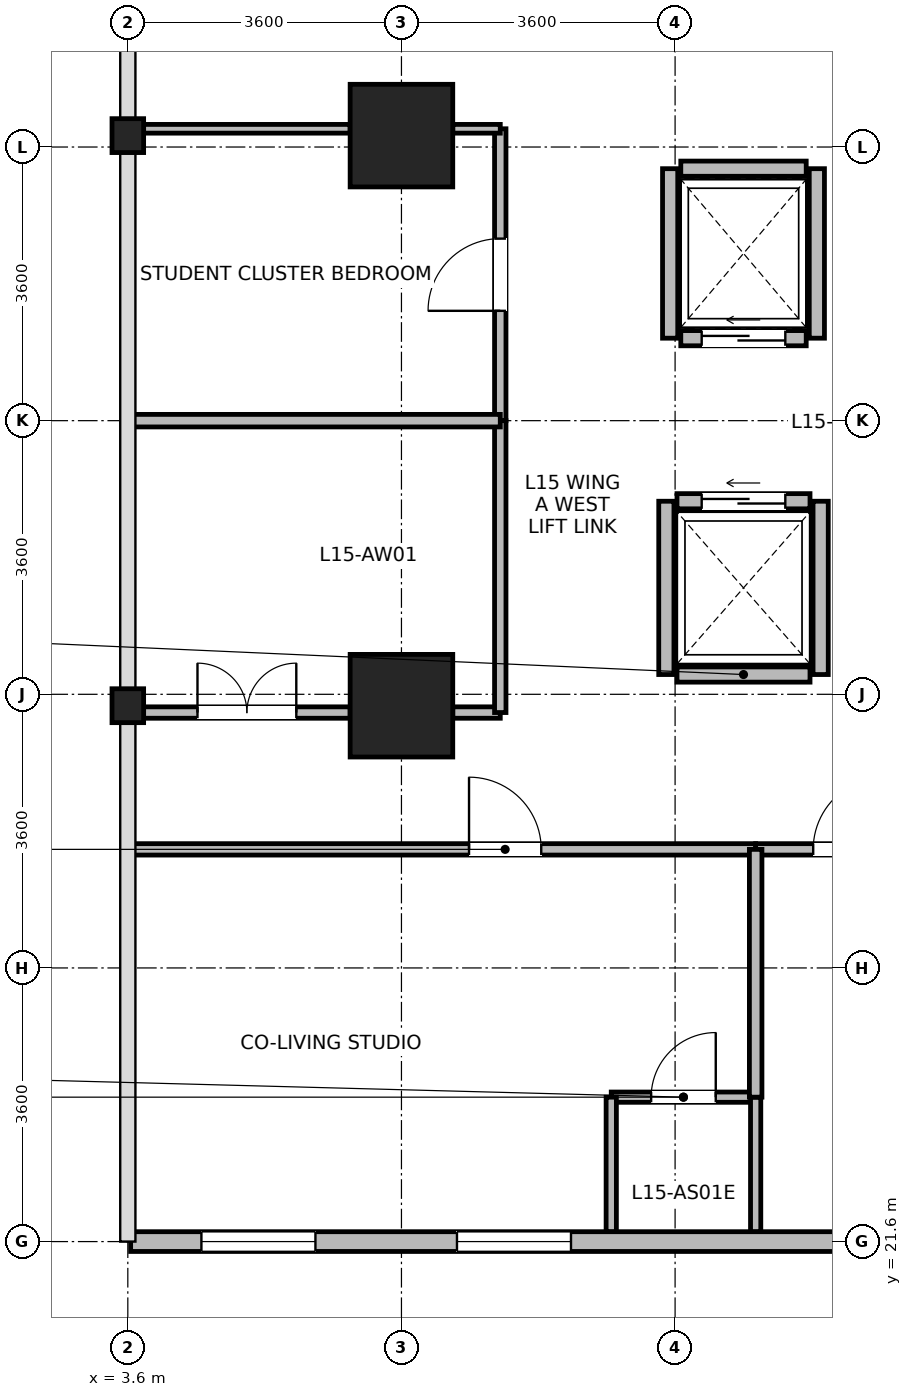
"""IFC4 building model, lengths in metres.
Left out: names, types, materials, properties, quantities, classifications, styles, units other than length and angle.
Written with IfcOpenShell. Run it as: python <this file> out.ifc"""

import sys

from ifc_helpers import new_model, si_unit, direction, frame, frame_2d, origin, origin_2d, place, context, subcontext, project, spatial, rectangle, i_section, extrude, source, transform, mapped, element, fill, save


model = new_model("IFC4")
c1 = context("Model", 3, precision=1e-05, world=origin(), true_north=direction((0.0, 1.0)))
c2 = subcontext(c1, "Body", "Model", "MODEL_VIEW")
j1 = project(units=[si_unit("LENGTHUNIT", "METRE"), si_unit("PLANEANGLEUNIT", "RADIAN")], contexts=[c1])
p1 = place(None, origin())
s1 = spatial("IfcSite", under=j1, at=p1, CompositionType="ELEMENT")
p2 = place(p1, origin())
s2 = spatial("IfcBuilding", under=s1, at=p2, CompositionType="ELEMENT")
p3 = place(p2, frame((0.0, 0.0, 62.3)))
s3 = spatial("IfcBuildingStorey", under=s2, at=p3, CompositionType="ELEMENT", Elevation=62.3)
m1 = source(origin(), c2, "Body", "SweptSolid", [
    extrude(rectangle(XDim=1.35, YDim=1.35, at=origin_2d()), origin(), (0.0, 0.0, 1.0), 3.7),
])
for number, where, z_axis, x_axis in (
    (1, (7.2, 28.65, 0.0), (0.0, 0.0, 1.0), (1.0, 0.0, 0.0)),
    (2, (7.2, 36.15, 0.0), (0.0, 0.0, 1.0), (1.0, 0.0, 0.0)),
):
    element("IfcColumn", number, at=place(p3, frame(where, z_axis=z_axis, x_axis=x_axis)), inside=s3, PredefinedType="COLUMN", context=c2, shape_type="MappedRepresentation", body=[
        mapped(m1, transform((0.0, 0.0, 0.0), x_axis=(1.0, 0.0, 0.0), y_axis=(0.0, 1.0, 0.0), z_axis=(0.0, 0.0, 1.0), scale=1.0)),
    ])
m2 = source(origin(), c2, "Body", "SweptSolid", [
    extrude(i_section(OverallWidth=0.416, OverallDepth=0.446, WebThickness=0.029, FlangeThickness=0.04, FilletRadius=0.015, at=origin_2d()), origin(), (0.0, 0.0, 1.0), 3.7),
])
for number, where, z_axis, x_axis in (
    (3, (3.6, 28.65, 0.0), (0.0, 0.0, 1.0), (1.0, 0.0, 0.0)),
    (4, (3.6, 36.15, 0.0), (0.0, 0.0, 1.0), (1.0, 0.0, 0.0)),
):
    element("IfcColumn", number, at=place(p3, frame(where, z_axis=z_axis, x_axis=x_axis)), inside=s3, PredefinedType="COLUMN", context=c2, shape_type="MappedRepresentation", body=[
        mapped(m2, transform((0.0, 0.0, 0.0), x_axis=(1.0, 0.0, 0.0), y_axis=(0.0, 1.0, 0.0), z_axis=(0.0, 0.0, 1.0), scale=1.0)),
    ])
p4 = place(p3, frame((13.724, 21.6, 0.0), z_axis=(0.0, 0.0, 1.0), x_axis=(-1.0, 0.0, 0.0)))
e5 = element("IfcWall", 5, at=p4, inside=s3, PredefinedType="STANDARD", context=c2, shape_type="SweptSolid", body=[
    extrude(rectangle(XDim=10.087, YDim=0.26, at=frame_2d((5.043, 0.0))), origin(), (0.0, 0.0, 1.0), 3.43),
])
p5 = place(p4, frame((4.293, 0.0, 0.85)))
e6 = element("IfcOpeningElement", 6, at=p5, cuts=e5, PredefinedType="OPENING", context=c2, shape_type="SweptSolid", body=[
    extrude(rectangle(XDim=1.5, YDim=1.85, at=frame_2d((0.75, 0.925))), frame((0.0, 0.14, 0.0), z_axis=(0.0, -1.0, 0.0), x_axis=(1.0, 0.0, 0.0)), (0.0, 0.0, 1.0), 0.28),
])
p6 = place(p4, frame((7.656, 0.0, 0.85)))
e7 = element("IfcOpeningElement", 7, at=p6, cuts=e5, PredefinedType="OPENING", context=c2, shape_type="SweptSolid", body=[
    extrude(rectangle(XDim=1.5, YDim=1.85, at=frame_2d((0.75, 0.925))), frame((0.0, 0.14, 0.0), z_axis=(0.0, -1.0, 0.0), x_axis=(1.0, 0.0, 0.0)), (0.0, 0.0, 1.0), 0.28),
])
p7 = place(p3, frame((10.825, 29.06, 0.0), z_axis=(0.0, 0.0, 1.0), x_axis=(1.0, 0.0, 0.0)))
e8 = element("IfcWall", 8, at=p7, inside=s3, PredefinedType="PARTITIONING", context=c2, shape_type="SweptSolid", body=[
    extrude(rectangle(XDim=1.75, YDim=0.2, at=frame_2d((0.875, 0.0))), origin(), (0.0, 0.0, 1.0), 3.43),
])
p8 = place(p3, frame((10.825, 31.34, 0.0), z_axis=(0.0, 0.0, 1.0), x_axis=(1.0, 0.0, 0.0)))
e9 = element("IfcWall", 9, at=p8, inside=s3, PredefinedType="PARTITIONING", context=c2, shape_type="SweptSolid", body=[
    extrude(rectangle(XDim=1.75, YDim=0.2, at=frame_2d((0.875, 0.0))), origin(), (0.0, 0.0, 1.0), 3.43),
])
p9 = place(p8, frame((0.325, 0.0, 0.0)))
e10 = element("IfcOpeningElement", 10, at=p9, cuts=e9, PredefinedType="OPENING", context=c2, shape_type="SweptSolid", body=[
    extrude(rectangle(XDim=1.1, YDim=2.12, at=frame_2d((0.55, 1.06))), frame((0.0, 0.11, 0.0), z_axis=(0.0, -1.0, 0.0), x_axis=(1.0, 0.0, 0.0)), (0.0, 0.0, 1.0), 0.22),
])
for number, where, z_axis, x_axis in (
    (11, (10.685, 29.06, 0.0), (0.0, 0.0, 1.0), (0.0, 1.0, 0.0)),
    (12, (12.715, 29.06, 0.0), (0.0, 0.0, 1.0), (0.0, 1.0, 0.0)),
):
    element("IfcWall", number, at=place(p3, frame(where, z_axis=z_axis, x_axis=x_axis)), inside=s3, PredefinedType="PARTITIONING", context=c2, shape_type="SweptSolid", body=[
        extrude(rectangle(XDim=2.28, YDim=0.2, at=frame_2d((1.14, 0.0))), origin(), (0.0, 0.0, 1.0), 3.43),
    ])
p10 = place(p3, frame((10.875, 33.485, 0.0), z_axis=(0.0, 0.0, 1.0), x_axis=(1.0, 0.0, 0.0)))
e13 = element("IfcWall", 13, at=p10, inside=s3, PredefinedType="PARTITIONING", context=c2, shape_type="SweptSolid", body=[
    extrude(rectangle(XDim=1.65, YDim=0.2, at=frame_2d((0.825, 0.0))), origin(), (0.0, 0.0, 1.0), 3.43),
])
p11 = place(p10, frame((0.275, 0.0, 0.0)))
e14 = element("IfcOpeningElement", 14, at=p11, cuts=e13, PredefinedType="OPENING", context=c2, shape_type="SweptSolid", body=[
    extrude(rectangle(XDim=1.1, YDim=2.12, at=frame_2d((0.55, 1.06))), frame((0.0, 0.11, 0.0), z_axis=(0.0, -1.0, 0.0), x_axis=(1.0, 0.0, 0.0)), (0.0, 0.0, 1.0), 0.22),
])
p12 = place(p3, frame((10.875, 35.715, 0.0), z_axis=(0.0, 0.0, 1.0), x_axis=(1.0, 0.0, 0.0)))
e15 = element("IfcWall", 15, at=p12, inside=s3, PredefinedType="PARTITIONING", context=c2, shape_type="SweptSolid", body=[
    extrude(rectangle(XDim=1.65, YDim=0.2, at=frame_2d((0.825, 0.0))), origin(), (0.0, 0.0, 1.0), 3.43),
])
for number, where, z_axis, x_axis in (
    (16, (10.735, 33.485, 0.0), (0.0, 0.0, 1.0), (0.0, 1.0, 0.0)),
    (17, (12.665, 33.485, 0.0), (0.0, 0.0, 1.0), (0.0, 1.0, 0.0)),
):
    element("IfcWall", number, at=place(p3, frame(where, z_axis=z_axis, x_axis=x_axis)), inside=s3, PredefinedType="PARTITIONING", context=c2, shape_type="SweptSolid", body=[
        extrude(rectangle(XDim=2.23, YDim=0.2, at=frame_2d((1.115, 0.0))), origin(), (0.0, 0.0, 1.0), 3.43),
    ])
p13 = place(p3, frame((9.96, 23.5, 0.0), z_axis=(0.0, 0.0, 1.0), x_axis=(1.0, 0.0, 0.0)))
e18 = element("IfcWall", 18, at=p13, inside=s3, PredefinedType="PARTITIONING", context=c2, shape_type="SweptSolid", body=[
    extrude(rectangle(XDim=1.9, YDim=0.135, at=frame_2d((0.95, 0.0))), origin(), (0.0, 0.0, 1.0), 3.43),
])
p14 = place(p13, frame((0.525, 0.0, 0.0)))
e19 = element("IfcOpeningElement", 19, at=p14, cuts=e18, PredefinedType="OPENING", context=c2, shape_type="SweptSolid", body=[
    extrude(rectangle(XDim=0.85, YDim=2.04, at=frame_2d((0.425, 1.02))), frame((0.0, 0.078, 0.0), z_axis=(0.0, -1.0, 0.0), x_axis=(1.0, 0.0, 0.0)), (0.0, 0.0, 1.0), 0.155),
])
for number, where, z_axis, x_axis in (
    (20, (9.96, 21.732, 0.0), (0.0, 0.0, 1.0), (0.0, 1.0, 0.0)),
    (21, (11.86, 21.732, 0.0), (0.0, 0.0, 1.0), (0.0, 1.0, 0.0)),
):
    element("IfcWall", number, at=place(p3, frame(where, z_axis=z_axis, x_axis=x_axis)), inside=s3, PredefinedType="PARTITIONING", context=c2, shape_type="SweptSolid", body=[
        extrude(rectangle(XDim=1.768, YDim=0.135, at=frame_2d((0.884, 0.0))), origin(), (0.0, 0.0, 1.0), 3.43),
    ])
p15 = place(p3, frame((3.62, 26.76, 0.0), z_axis=(0.0, 0.0, 1.0), x_axis=(1.0, 0.0, 0.0)))
e22 = element("IfcWall", 22, at=p15, inside=s3, PredefinedType="PARTITIONING", context=c2, shape_type="SweptSolid", body=[
    extrude(rectangle(XDim=8.24, YDim=0.15, at=frame_2d((4.12, 0.0))), origin(), (0.0, 0.0, 1.0), 3.43),
])
p16 = place(p15, frame((4.469, 0.0, 0.0)))
e23 = element("IfcOpeningElement", 23, at=p16, cuts=e22, PredefinedType="OPENING", context=c2, shape_type="SweptSolid", body=[
    extrude(rectangle(XDim=0.95, YDim=2.1, at=frame_2d((0.475, 1.05))), frame((0.0, 0.085, 0.0), z_axis=(0.0, -1.0, 0.0), x_axis=(1.0, 0.0, 0.0)), (0.0, 0.0, 1.0), 0.17),
])
p17 = place(p3, frame((11.86, 26.76, 0.0), z_axis=(0.0, 0.0, 1.0), x_axis=(1.0, 0.0, 0.0)))
e24 = element("IfcWall", 24, at=p17, inside=s3, PredefinedType="PARTITIONING", context=c2, shape_type="SweptSolid", body=[
    extrude(rectangle(XDim=5.6, YDim=0.15, at=frame_2d((2.8, 0.0))), origin(), (0.0, 0.0, 1.0), 3.43),
])
p18 = place(p17, frame((0.757, 0.0, 0.0)))
e25 = element("IfcOpeningElement", 25, at=p18, cuts=e24, PredefinedType="OPENING", context=c2, shape_type="SweptSolid", body=[
    extrude(rectangle(XDim=0.95, YDim=2.1, at=frame_2d((0.475, 1.05))), frame((0.0, 0.085, 0.0), z_axis=(0.0, -1.0, 0.0), x_axis=(1.0, 0.0, 0.0)), (0.0, 0.0, 1.0), 0.17),
])
p19 = place(p3, frame((3.808, 28.56, 0.0), z_axis=(0.0, 0.0, 1.0), x_axis=(1.0, 0.0, 0.0)))
e26 = element("IfcWall", 26, at=p19, inside=s3, PredefinedType="PARTITIONING", context=c2, shape_type="SweptSolid", body=[
    extrude(rectangle(XDim=2.717, YDim=0.15, at=frame_2d((1.358, 0.0))), origin(), (0.0, 0.0, 1.0), 2.78),
])
p20 = place(p19, frame((0.708, 0.0, 0.0)))
e27 = element("IfcOpeningElement", 27, at=p20, cuts=e26, PredefinedType="OPENING", context=c2, shape_type="SweptSolid", body=[
    extrude(rectangle(XDim=1.3, YDim=2.12, at=frame_2d((0.65, 1.06))), frame((0.0, 0.085, 0.0), z_axis=(0.0, -1.0, 0.0), x_axis=(1.0, 0.0, 0.0)), (0.0, 0.0, 1.0), 0.17),
])
p21 = place(p3, frame((7.875, 28.56, 0.0), z_axis=(0.0, 0.0, 1.0), x_axis=(1.0, 0.0, 0.0)))
e28 = element("IfcWall", 28, at=p21, inside=s3, PredefinedType="PARTITIONING", context=c2, shape_type="SweptSolid", body=[
    extrude(rectangle(XDim=0.625, YDim=0.15, at=frame_2d((0.312, 0.0))), origin(), (0.0, 0.0, 1.0), 2.78),
])
p22 = place(p3, frame((8.5, 32.4, 0.0), z_axis=(0.0, 0.0, 1.0), x_axis=(0.0, 1.0, 0.0)))
e29 = element("IfcWall", 29, at=p22, inside=s3, PredefinedType="PARTITIONING", context=c2, shape_type="SweptSolid", body=[
    extrude(rectangle(XDim=3.84, YDim=0.15, at=frame_2d((1.92, 0.0))), origin(), (0.0, 0.0, 1.0), 3.43),
])
p23 = place(p22, frame((1.445, 0.0, 0.0)))
e30 = element("IfcOpeningElement", 30, at=p23, cuts=e29, PredefinedType="OPENING", context=c2, shape_type="SweptSolid", body=[
    extrude(rectangle(XDim=0.95, YDim=2.1, at=frame_2d((0.475, 1.05))), frame((0.0, 0.085, 0.0), z_axis=(0.0, -1.0, 0.0), x_axis=(1.0, 0.0, 0.0)), (0.0, 0.0, 1.0), 0.17),
])
p24 = place(p3, frame((8.5, 28.56, 0.0), z_axis=(0.0, 0.0, 1.0), x_axis=(0.0, 1.0, 0.0)))
e31 = element("IfcWall", 31, at=p24, inside=s3, PredefinedType="PARTITIONING", context=c2, shape_type="SweptSolid", body=[
    extrude(rectangle(XDim=3.84, YDim=0.15, at=frame_2d((1.92, 0.0))), origin(), (0.0, 0.0, 1.0), 3.43),
])
p25 = place(p3, frame((3.62, 32.4, 0.0), z_axis=(0.0, 0.0, 1.0), x_axis=(1.0, 0.0, 0.0)))
e32 = element("IfcWall", 32, at=p25, inside=s3, PredefinedType="PARTITIONING", context=c2, shape_type="SweptSolid", body=[
    extrude(rectangle(XDim=4.88, YDim=0.165, at=frame_2d((2.44, 0.0))), origin(), (0.0, 0.0, 1.0), 3.43),
])
p26 = place(p3, frame((3.808, 36.24, 0.0), z_axis=(0.0, 0.0, 1.0), x_axis=(1.0, 0.0, 0.0)))
e33 = element("IfcWall", 33, at=p26, inside=s3, PredefinedType="PARTITIONING", context=c2, shape_type="SweptSolid", body=[
    extrude(rectangle(XDim=2.717, YDim=0.115, at=frame_2d((1.358, 0.0))), origin(), (0.0, 0.0, 1.0), 2.78),
])
p27 = place(p3, frame((7.875, 36.24, 0.0), z_axis=(0.0, 0.0, 1.0), x_axis=(1.0, 0.0, 0.0)))
e34 = element("IfcWall", 34, at=p27, inside=s3, PredefinedType="PARTITIONING", context=c2, shape_type="SweptSolid", body=[
    extrude(rectangle(XDim=0.625, YDim=0.115, at=frame_2d((0.312, 0.0))), origin(), (0.0, 0.0, 1.0), 2.78),
])
p28 = place(p3, frame((11.86, 23.5, 0.0), z_axis=(0.0, 0.0, 1.0), x_axis=(0.0, 1.0, 0.0)))
e35 = element("IfcWall", 35, at=p28, inside=s3, PredefinedType="PARTITIONING", context=c2, shape_type="SweptSolid", body=[
    extrude(rectangle(XDim=3.26, YDim=0.165, at=frame_2d((1.63, 0.0))), origin(), (0.0, 0.0, 1.0), 3.43),
])
p29 = place(p5, origin())
e36 = element("IfcWindow", 36, at=p29, inside=s3, PartitioningType="SINGLE_PANEL", PredefinedType="WINDOW", context=c2, shape_type="SweptSolid", body=[
    extrude(rectangle(XDim=1.5, YDim=1.85, at=frame_2d((0.75, 0.925))), frame((0.0, 0.03, 0.0), z_axis=(0.0, -1.0, 0.0), x_axis=(1.0, 0.0, 0.0)), (0.0, 0.0, 1.0), 0.06),
])
fill(e6, e36)
p30 = place(p6, origin())
e37 = element("IfcWindow", 37, at=p30, inside=s3, PartitioningType="SINGLE_PANEL", PredefinedType="WINDOW", context=c2, shape_type="SweptSolid", body=[
    extrude(rectangle(XDim=1.5, YDim=1.85, at=frame_2d((0.75, 0.925))), frame((0.0, 0.03, 0.0), z_axis=(0.0, -1.0, 0.0), x_axis=(1.0, 0.0, 0.0)), (0.0, 0.0, 1.0), 0.06),
])
fill(e7, e37)
p31 = place(p9, origin())
e38 = element("IfcDoor", 38, at=p31, inside=s3, OperationType="SLIDING_TO_LEFT", PredefinedType="DOOR", context=c2, shape_type="SweptSolid", body=[
    extrude(rectangle(XDim=1.1, YDim=2.12, at=frame_2d((0.55, 1.06))), frame((0.0, 0.025, 0.0), z_axis=(0.0, -1.0, 0.0), x_axis=(1.0, 0.0, 0.0)), (0.0, 0.0, 1.0), 0.05),
])
fill(e10, e38)
p32 = place(p11, origin())
e39 = element("IfcDoor", 39, at=p32, inside=s3, OperationType="SLIDING_TO_LEFT", PredefinedType="DOOR", context=c2, shape_type="SweptSolid", body=[
    extrude(rectangle(XDim=1.1, YDim=2.12, at=frame_2d((0.55, 1.06))), frame((0.0, 0.025, 0.0), z_axis=(0.0, -1.0, 0.0), x_axis=(1.0, 0.0, 0.0)), (0.0, 0.0, 1.0), 0.05),
])
fill(e14, e39)
p33 = place(p14, origin())
e40 = element("IfcDoor", 40, at=p33, inside=s3, OperationType="SINGLE_SWING_RIGHT", PredefinedType="DOOR", context=c2, shape_type="SweptSolid", body=[
    extrude(rectangle(XDim=0.85, YDim=2.04, at=frame_2d((0.425, 1.02))), frame((0.0, 0.025, 0.0), z_axis=(0.0, -1.0, 0.0), x_axis=(1.0, 0.0, 0.0)), (0.0, 0.0, 1.0), 0.05),
])
fill(e19, e40)
p34 = place(p16, origin())
e41 = element("IfcDoor", 41, at=p34, inside=s3, OperationType="SINGLE_SWING_LEFT", PredefinedType="DOOR", context=c2, shape_type="SweptSolid", body=[
    extrude(rectangle(XDim=0.95, YDim=2.1, at=frame_2d((0.475, 1.05))), frame((0.0, 0.025, 0.0), z_axis=(0.0, -1.0, 0.0), x_axis=(1.0, 0.0, 0.0)), (0.0, 0.0, 1.0), 0.05),
])
fill(e23, e41)
p35 = place(p18, origin())
e42 = element("IfcDoor", 42, at=p35, inside=s3, OperationType="SINGLE_SWING_RIGHT", PredefinedType="DOOR", context=c2, shape_type="SweptSolid", body=[
    extrude(rectangle(XDim=0.95, YDim=2.1, at=frame_2d((0.475, 1.05))), frame((0.0, 0.025, 0.0), z_axis=(0.0, -1.0, 0.0), x_axis=(1.0, 0.0, 0.0)), (0.0, 0.0, 1.0), 0.05),
])
fill(e25, e42)
p36 = place(p20, origin())
e43 = element("IfcDoor", 43, at=p36, inside=s3, OperationType="DOUBLE_DOOR_SINGLE_SWING", PredefinedType="DOOR", context=c2, shape_type="SweptSolid", body=[
    extrude(rectangle(XDim=1.3, YDim=2.12, at=frame_2d((0.65, 1.06))), frame((0.0, 0.025, 0.0), z_axis=(0.0, -1.0, 0.0), x_axis=(1.0, 0.0, 0.0)), (0.0, 0.0, 1.0), 0.05),
])
fill(e27, e43)
p37 = place(p23, origin())
e44 = element("IfcDoor", 44, at=p37, inside=s3, OperationType="SINGLE_SWING_LEFT", PredefinedType="DOOR", context=c2, shape_type="SweptSolid", body=[
    extrude(rectangle(XDim=0.95, YDim=2.1, at=frame_2d((0.475, 1.05))), frame((0.0, 0.025, 0.0), z_axis=(0.0, -1.0, 0.0), x_axis=(1.0, 0.0, 0.0)), (0.0, 0.0, 1.0), 0.05),
])
fill(e30, e44)
save(model, sys.argv[1])
